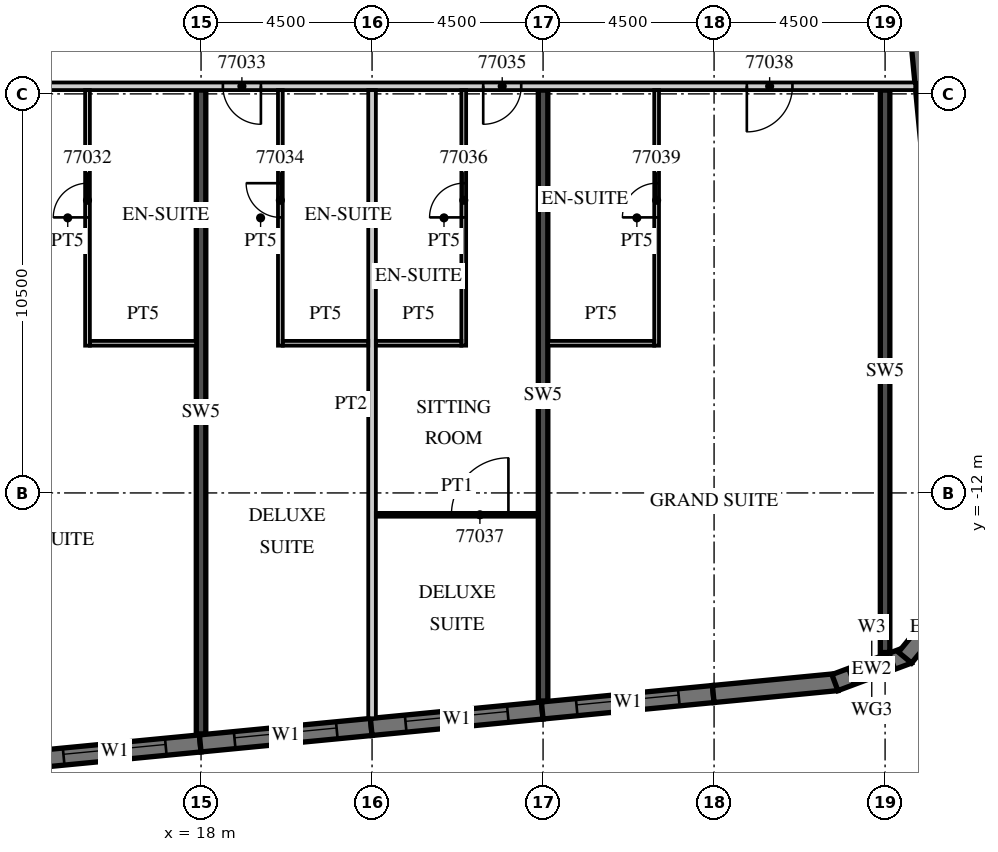
"""IFC4 building model, lengths in metres.
Left out: names, types, materials, properties, quantities, classifications, styles, units other than length and angle.
Written with IfcOpenShell. Run it as: python <this file> out.ifc"""

import sys

from ifc_helpers import new_model, si_unit, direction, frame, frame_2d, origin, place, context, subcontext, project, spatial, polyline, rectangle, outline, extrude, element, fill, save


model = new_model("IFC4")
c1 = context("Model", 3, precision=1e-05, world=origin(), true_north=direction((0.0, 1.0)))
c2 = subcontext(c1, "Body", "Model", "MODEL_VIEW")
j1 = project(units=[si_unit("LENGTHUNIT", "METRE"), si_unit("PLANEANGLEUNIT", "RADIAN")], contexts=[c1])
p1 = place(None, origin())
s1 = spatial("IfcSite", under=j1, at=p1, CompositionType="ELEMENT")
p2 = place(p1, origin())
s2 = spatial("IfcBuilding", under=s1, at=p2, CompositionType="ELEMENT")
p3 = place(p2, frame((0.0, 0.0, 304.8)))
s3 = spatial("IfcBuildingStorey", under=s2, at=p3, CompositionType="ELEMENT", Elevation=304.8)
p4 = place(p3, frame((18.0, -18.341, 0.0), z_axis=(0.0, 0.0, 1.0), x_axis=(0.0, 1.0, 0.0)))
e1 = element("IfcWall", 1, at=p4, inside=s3, PredefinedType="SHEAR", context=c2, shape_type="SweptSolid", body=[
    extrude(rectangle(XDim=16.941, YDim=0.25, at=frame_2d((8.47, 0.0))), origin(), (0.0, 0.0, 1.0), 3.3),
])
p5 = place(p3, frame((27.0, -17.474, 0.0), z_axis=(0.0, 0.0, 1.0), x_axis=(0.0, 1.0, 0.0)))
e2 = element("IfcWall", 2, at=p5, inside=s3, PredefinedType="SHEAR", context=c2, shape_type="SweptSolid", body=[
    extrude(rectangle(XDim=16.074, YDim=0.25, at=frame_2d((8.037, 0.0))), origin(), (0.0, 0.0, 1.0), 3.3),
])
p6 = place(p3, frame((36.0, -16.199, 0.0), z_axis=(0.0, 0.0, 1.0), x_axis=(0.0, 1.0, 0.0)))
e3 = element("IfcWall", 3, at=p6, inside=s3, PredefinedType="SHEAR", context=c2, shape_type="SweptSolid", body=[
    extrude(rectangle(XDim=14.799, YDim=0.25, at=frame_2d((7.399, 0.0))), origin(), (0.0, 0.0, 1.0), 3.3),
])
p7 = place(p3, frame((13.478, -19.024, 0.0), z_axis=(0.0, 0.0, 1.0), x_axis=(0.995395662684, 0.095851315644, 0.0)))
e4 = element("IfcWall", 4, at=p7, inside=s3, PredefinedType="SOLIDWALL", context=c2, shape_type="SweptSolid", body=[
    extrude(rectangle(XDim=4.521, YDim=0.45, at=frame_2d((2.26, 0.0))), origin(), (0.0, 0.0, 1.0), 2.9),
])
p8 = place(p7, frame((0.91, 0.0, 0.45)))
e5 = element("IfcOpeningElement", 5, at=p8, cuts=e4, PredefinedType="OPENING", context=c2, shape_type="SweptSolid", body=[
    extrude(rectangle(XDim=2.7, YDim=2.25, at=frame_2d((1.35, 1.125))), frame((0.0, 0.235, 0.0), z_axis=(0.0, -1.0, 0.0), x_axis=(1.0, 0.0, 0.0)), (0.0, 0.0, 1.0), 0.47),
])
p9 = place(p3, frame((17.979, -18.591, 0.0), z_axis=(0.0, 0.0, 1.0), x_axis=(0.995395166513, 0.095856468129, 0.0)))
e6 = element("IfcWall", 6, at=p9, inside=s3, PredefinedType="SOLIDWALL", context=c2, shape_type="SweptSolid", body=[
    extrude(rectangle(XDim=4.521, YDim=0.45, at=frame_2d((2.26, 0.0))), origin(), (0.0, 0.0, 1.0), 2.9),
])
p10 = place(p9, frame((0.91, 0.0, 0.45)))
e7 = element("IfcOpeningElement", 7, at=p10, cuts=e6, PredefinedType="OPENING", context=c2, shape_type="SweptSolid", body=[
    extrude(rectangle(XDim=2.7, YDim=2.25, at=frame_2d((1.35, 1.125))), frame((0.0, 0.235, 0.0), z_axis=(0.0, -1.0, 0.0), x_axis=(1.0, 0.0, 0.0)), (0.0, 0.0, 1.0), 0.47),
])
p11 = place(p3, frame((22.479, -18.157, 0.0), z_axis=(0.0, 0.0, 1.0), x_axis=(0.995400317863, 0.09580296028, 0.0)))
e8 = element("IfcWall", 8, at=p11, inside=s3, PredefinedType="SOLIDWALL", context=c2, shape_type="SweptSolid", body=[
    extrude(rectangle(XDim=4.521, YDim=0.45, at=frame_2d((2.26, 0.0))), origin(), (0.0, 0.0, 1.0), 2.9),
])
p12 = place(p11, frame((0.91, 0.0, 0.45)))
e9 = element("IfcOpeningElement", 9, at=p12, cuts=e8, PredefinedType="OPENING", context=c2, shape_type="SweptSolid", body=[
    extrude(rectangle(XDim=2.7, YDim=2.25, at=frame_2d((1.35, 1.125))), frame((0.0, 0.235, 0.0), z_axis=(0.0, -1.0, 0.0), x_axis=(1.0, 0.0, 0.0)), (0.0, 0.0, 1.0), 0.47),
])
p13 = place(p3, frame((26.979, -17.724, 0.0), z_axis=(0.0, 0.0, 1.0), x_axis=(0.995395166513, 0.095856468129, 0.0)))
e10 = element("IfcWall", 10, at=p13, inside=s3, PredefinedType="SOLIDWALL", context=c2, shape_type="SweptSolid", body=[
    extrude(rectangle(XDim=4.521, YDim=0.45, at=frame_2d((2.26, 0.0))), origin(), (0.0, 0.0, 1.0), 2.9),
])
p14 = place(p13, frame((0.91, 0.0, 0.45)))
e11 = element("IfcOpeningElement", 11, at=p14, cuts=e10, PredefinedType="OPENING", context=c2, shape_type="SweptSolid", body=[
    extrude(rectangle(XDim=2.7, YDim=2.25, at=frame_2d((1.35, 1.125))), frame((0.0, 0.235, 0.0), z_axis=(0.0, -1.0, 0.0), x_axis=(1.0, 0.0, 0.0)), (0.0, 0.0, 1.0), 0.47),
])
p15 = place(p3, frame((31.479, -17.291, 0.0), z_axis=(0.0, 0.0, 1.0), x_axis=(0.995396037172, 0.095847426584, 0.0)))
e12 = element("IfcWall", 12, at=p15, inside=s3, PredefinedType="SOLIDWALL", context=c2, shape_type="SweptSolid", body=[
    extrude(rectangle(XDim=3.273, YDim=0.45, at=frame_2d((1.637, 0.0))), origin(), (0.0, 0.0, 1.0), 2.9),
])
p16 = place(p3, frame((34.679, -16.99, 0.0), z_axis=(0.0, 0.0, 1.0), x_axis=(0.936677599948, 0.350192909346, 0.0)))
e13 = element("IfcWall", 13, at=p16, inside=s3, PredefinedType="SOLIDWALL", context=c2, shape_type="SweptSolid", body=[
    extrude(outline(polyline([(0.0, -0.225), (2.071, -0.225), (1.95, 0.225), (0.121, 0.225), (0.0, -0.225)])), origin(), (0.0, 0.0, 1.0), 2.9),
])
p17 = place(p16, frame((0.435, 0.0, 0.45)))
e14 = element("IfcOpeningElement", 14, at=p17, cuts=e13, PredefinedType="OPENING", context=c2, shape_type="SweptSolid", body=[
    extrude(rectangle(XDim=1.2, YDim=2.25, at=frame_2d((0.6, 1.125))), frame((0.0, 0.235, 0.0), z_axis=(0.0, -1.0, 0.0), x_axis=(1.0, 0.0, 0.0)), (0.0, 0.0, 1.0), 0.47),
])
p18 = place(p3, frame((36.524, -16.333, 0.0), z_axis=(0.0, 0.0, 1.0), x_axis=(0.636046112757, 0.771651049663, 0.0)))
e15 = element("IfcWall", 15, at=p18, inside=s3, PredefinedType="SOLIDWALL", context=c2, shape_type="SweptSolid", body=[
    extrude(outline(polyline([(0.0, -0.225), (2.071, -0.225), (1.95, 0.225), (0.121, 0.225), (0.0, -0.225)])), origin(), (0.0, 0.0, 1.0), 2.9),
])
p19 = place(p3, frame((37.445, -5.722, 0.0), z_axis=(0.0, 0.0, 1.0), x_axis=(-0.09580296028, 0.995400317863, 0.0)))
e16 = element("IfcWall", 16, at=p19, inside=s3, PredefinedType="SOLIDWALL", context=c2, shape_type="SweptSolid", body=[
    extrude(rectangle(XDim=4.521, YDim=0.45, at=frame_2d((2.26, 0.0))), origin(), (0.0, 0.0, 1.0), 2.9),
])
p20 = place(p3, frame((37.012, -1.222, 0.0), z_axis=(0.0, 0.0, 1.0), x_axis=(-0.095884111621, 0.99539250406, 0.0)))
e17 = element("IfcWall", 17, at=p20, inside=s3, PredefinedType="SOLIDWALL", context=c2, shape_type="SweptSolid", body=[
    extrude(rectangle(XDim=2.411, YDim=0.45, at=frame_2d((1.206, 0.0))), origin(), (0.0, 0.0, 1.0), 2.9),
])
p21 = place(p3, frame((-13.5, -1.3, 0.0), z_axis=(0.0, 0.0, 1.0), x_axis=(1.0, 0.0, 0.0)))
e18 = element("IfcWall", 18, at=p21, inside=s3, PredefinedType="PARTITIONING", context=c2, shape_type="SweptSolid", body=[
    extrude(rectangle(XDim=50.293, YDim=0.2, at=frame_2d((25.146, 0.0))), origin(), (0.0, 0.0, 1.0), 2.9),
])
p22 = place(p21, frame((0.575, 0.0, 0.0)))
e19 = element("IfcOpeningElement", 19, at=p22, cuts=e18, PredefinedType="OPENING", context=c2, shape_type="SweptSolid", body=[
    extrude(rectangle(XDim=1.0, YDim=2.1, at=frame_2d((0.5, 1.05))), frame((0.0, 0.11, 0.0), z_axis=(0.0, -1.0, 0.0), x_axis=(1.0, 0.0, 0.0)), (0.0, 0.0, 1.0), 0.22),
])
p23 = place(p21, frame((6.938, 0.0, 0.0)))
e20 = element("IfcOpeningElement", 20, at=p23, cuts=e18, PredefinedType="OPENING", context=c2, shape_type="SweptSolid", body=[
    extrude(rectangle(XDim=1.2, YDim=2.1, at=frame_2d((0.6, 1.05))), frame((0.0, 0.11, 0.0), z_axis=(0.0, -1.0, 0.0), x_axis=(1.0, 0.0, 0.0)), (0.0, 0.0, 1.0), 0.22),
])
p24 = place(p21, frame((16.45, 0.0, 0.0)))
e21 = element("IfcOpeningElement", 21, at=p24, cuts=e18, PredefinedType="OPENING", context=c2, shape_type="SweptSolid", body=[
    extrude(rectangle(XDim=1.0, YDim=2.1, at=frame_2d((0.5, 1.05))), frame((0.0, 0.11, 0.0), z_axis=(0.0, -1.0, 0.0), x_axis=(1.0, 0.0, 0.0)), (0.0, 0.0, 1.0), 0.22),
])
p25 = place(p21, frame((20.925, 0.0, 0.0)))
e22 = element("IfcOpeningElement", 22, at=p25, cuts=e18, PredefinedType="OPENING", context=c2, shape_type="SweptSolid", body=[
    extrude(rectangle(XDim=1.0, YDim=2.1, at=frame_2d((0.5, 1.05))), frame((0.0, 0.11, 0.0), z_axis=(0.0, -1.0, 0.0), x_axis=(1.0, 0.0, 0.0)), (0.0, 0.0, 1.0), 0.22),
])
p26 = place(p21, frame((24.938, 0.0, 0.0)))
e23 = element("IfcOpeningElement", 23, at=p26, cuts=e18, PredefinedType="OPENING", context=c2, shape_type="SweptSolid", body=[
    extrude(rectangle(XDim=1.2, YDim=2.1, at=frame_2d((0.6, 1.05))), frame((0.0, 0.11, 0.0), z_axis=(0.0, -1.0, 0.0), x_axis=(1.0, 0.0, 0.0)), (0.0, 0.0, 1.0), 0.22),
])
p27 = place(p21, frame((32.075, 0.0, 0.0)))
e24 = element("IfcOpeningElement", 24, at=p27, cuts=e18, PredefinedType="OPENING", context=c2, shape_type="SweptSolid", body=[
    extrude(rectangle(XDim=1.0, YDim=2.1, at=frame_2d((0.5, 1.05))), frame((0.0, 0.11, 0.0), z_axis=(0.0, -1.0, 0.0), x_axis=(1.0, 0.0, 0.0)), (0.0, 0.0, 1.0), 0.22),
])
p28 = place(p21, frame((38.925, 0.0, 0.0)))
e25 = element("IfcOpeningElement", 25, at=p28, cuts=e18, PredefinedType="OPENING", context=c2, shape_type="SweptSolid", body=[
    extrude(rectangle(XDim=1.0, YDim=2.1, at=frame_2d((0.5, 1.05))), frame((0.0, 0.11, 0.0), z_axis=(0.0, -1.0, 0.0), x_axis=(1.0, 0.0, 0.0)), (0.0, 0.0, 1.0), 0.22),
])
p29 = place(p21, frame((45.862, 0.0, 0.0)))
e26 = element("IfcOpeningElement", 26, at=p29, cuts=e18, PredefinedType="OPENING", context=c2, shape_type="SweptSolid", body=[
    extrude(rectangle(XDim=1.2, YDim=2.1, at=frame_2d((0.6, 1.05))), frame((0.0, 0.11, 0.0), z_axis=(0.0, -1.0, 0.0), x_axis=(1.0, 0.0, 0.0)), (0.0, 0.0, 1.0), 0.22),
])
p30 = place(p3, frame((15.012, -8.125, 0.0), z_axis=(0.0, 0.0, 1.0), x_axis=(0.0, 1.0, 0.0)))
e27 = element("IfcWall", 27, at=p30, inside=s3, PredefinedType="PARTITIONING", context=c2, shape_type="SweptSolid", body=[
    extrude(rectangle(XDim=6.725, YDim=0.125, at=frame_2d((3.363, 0.0))), origin(), (0.0, 0.0, 1.0), 2.9),
])
p31 = place(p30, frame((3.375, 0.0, 0.0)))
e28 = element("IfcOpeningElement", 28, at=p31, cuts=e27, PredefinedType="OPENING", context=c2, shape_type="SweptSolid", body=[
    extrude(rectangle(XDim=0.9, YDim=2.1, at=frame_2d((0.45, 1.05))), frame((0.0, 0.073, 0.0), z_axis=(0.0, -1.0, 0.0), x_axis=(1.0, 0.0, 0.0)), (0.0, 0.0, 1.0), 0.145),
])
p32 = place(p3, frame((15.075, -8.062, 0.0), z_axis=(0.0, 0.0, 1.0), x_axis=(1.0, 0.0, 0.0)))
e29 = element("IfcWall", 29, at=p32, inside=s3, PredefinedType="PARTITIONING", context=c2, shape_type="SweptSolid", body=[
    extrude(rectangle(XDim=2.8, YDim=0.125, at=frame_2d((1.4, 0.0))), origin(), (0.0, 0.0, 1.0), 2.9),
])
p33 = place(p3, frame((22.5, -17.929, 0.0), z_axis=(0.0, 0.0, 1.0), x_axis=(0.0, 1.0, 0.0)))
e30 = element("IfcWall", 30, at=p33, inside=s3, PredefinedType="PARTITIONING", context=c2, shape_type="SweptSolid", body=[
    extrude(rectangle(XDim=16.529, YDim=0.2, at=frame_2d((8.265, 0.0))), origin(), (0.0, 0.0, 1.0), 2.9),
])
p34 = place(p3, frame((20.087, -8.125, 0.0), z_axis=(0.0, 0.0, 1.0), x_axis=(0.0, 1.0, 0.0)))
e31 = element("IfcWall", 31, at=p34, inside=s3, PredefinedType="PARTITIONING", context=c2, shape_type="SweptSolid", body=[
    extrude(rectangle(XDim=6.725, YDim=0.125, at=frame_2d((3.363, 0.0))), origin(), (0.0, 0.0, 1.0), 2.9),
])
p35 = place(p34, frame((3.375, 0.0, 0.0)))
e32 = element("IfcOpeningElement", 32, at=p35, cuts=e31, PredefinedType="OPENING", context=c2, shape_type="SweptSolid", body=[
    extrude(rectangle(XDim=0.9, YDim=2.1, at=frame_2d((0.45, 1.05))), frame((0.0, 0.073, 0.0), z_axis=(0.0, -1.0, 0.0), x_axis=(1.0, 0.0, 0.0)), (0.0, 0.0, 1.0), 0.145),
])
p36 = place(p3, frame((20.15, -8.062, 0.0), z_axis=(0.0, 0.0, 1.0), x_axis=(1.0, 0.0, 0.0)))
e33 = element("IfcWall", 33, at=p36, inside=s3, PredefinedType="PARTITIONING", context=c2, shape_type="SweptSolid", body=[
    extrude(rectangle(XDim=2.25, YDim=0.125, at=frame_2d((1.125, 0.0))), origin(), (0.0, 0.0, 1.0), 2.9),
])
p37 = place(p3, frame((24.913, -8.125, 0.0), z_axis=(0.0, 0.0, 1.0), x_axis=(0.0, 1.0, 0.0)))
e34 = element("IfcWall", 34, at=p37, inside=s3, PredefinedType="PARTITIONING", context=c2, shape_type="SweptSolid", body=[
    extrude(rectangle(XDim=6.725, YDim=0.125, at=frame_2d((3.363, 0.0))), origin(), (0.0, 0.0, 1.0), 2.9),
])
p38 = place(p37, frame((3.375, 0.0, 0.0)))
e35 = element("IfcOpeningElement", 35, at=p38, cuts=e34, PredefinedType="OPENING", context=c2, shape_type="SweptSolid", body=[
    extrude(rectangle(XDim=0.9, YDim=2.1, at=frame_2d((0.45, 1.05))), frame((0.0, 0.073, 0.0), z_axis=(0.0, -1.0, 0.0), x_axis=(1.0, 0.0, 0.0)), (0.0, 0.0, 1.0), 0.145),
])
p39 = place(p3, frame((22.6, -8.062, 0.0), z_axis=(0.0, 0.0, 1.0), x_axis=(1.0, 0.0, 0.0)))
e36 = element("IfcWall", 36, at=p39, inside=s3, PredefinedType="PARTITIONING", context=c2, shape_type="SweptSolid", body=[
    extrude(rectangle(XDim=2.25, YDim=0.125, at=frame_2d((1.125, 0.0))), origin(), (0.0, 0.0, 1.0), 2.9),
])
p40 = place(p3, frame((22.6, -12.575, 0.0), z_axis=(0.0, 0.0, 1.0), x_axis=(1.0, 0.0, 0.0)))
e37 = element("IfcWall", 37, at=p40, inside=s3, PredefinedType="PARTITIONING", context=c2, shape_type="SweptSolid", body=[
    extrude(rectangle(XDim=4.275, YDim=0.1, at=frame_2d((2.137, 0.0))), origin(), (0.0, 0.0, 1.0), 2.9),
])
p41 = place(p40, frame((1.988, 0.0, 0.0)))
e38 = element("IfcOpeningElement", 38, at=p41, cuts=e37, PredefinedType="OPENING", context=c2, shape_type="SweptSolid", body=[
    extrude(rectangle(XDim=1.5, YDim=2.1, at=frame_2d((0.75, 1.05))), frame((0.0, 0.06, 0.0), z_axis=(0.0, -1.0, 0.0), x_axis=(1.0, 0.0, 0.0)), (0.0, 0.0, 1.0), 0.12),
])
p42 = place(p3, frame((29.988, -8.125, 0.0), z_axis=(0.0, 0.0, 1.0), x_axis=(0.0, 1.0, 0.0)))
e39 = element("IfcWall", 39, at=p42, inside=s3, PredefinedType="PARTITIONING", context=c2, shape_type="SweptSolid", body=[
    extrude(rectangle(XDim=6.725, YDim=0.125, at=frame_2d((3.363, 0.0))), origin(), (0.0, 0.0, 1.0), 2.9),
])
p43 = place(p42, frame((3.375, 0.0, 0.0)))
e40 = element("IfcOpeningElement", 40, at=p43, cuts=e39, PredefinedType="OPENING", context=c2, shape_type="SweptSolid", body=[
    extrude(rectangle(XDim=0.9, YDim=2.1, at=frame_2d((0.45, 1.05))), frame((0.0, 0.073, 0.0), z_axis=(0.0, -1.0, 0.0), x_axis=(1.0, 0.0, 0.0)), (0.0, 0.0, 1.0), 0.145),
])
p44 = place(p3, frame((27.125, -8.062, 0.0), z_axis=(0.0, 0.0, 1.0), x_axis=(1.0, 0.0, 0.0)))
e41 = element("IfcWall", 41, at=p44, inside=s3, PredefinedType="PARTITIONING", context=c2, shape_type="SweptSolid", body=[
    extrude(rectangle(XDim=2.8, YDim=0.125, at=frame_2d((1.4, 0.0))), origin(), (0.0, 0.0, 1.0), 2.9),
])
p45 = place(p8, origin())
e42 = element("IfcWindow", 42, at=p45, inside=s3, PartitioningType="SINGLE_PANEL", PredefinedType="WINDOW", context=c2, shape_type="SweptSolid", body=[
    extrude(rectangle(XDim=2.7, YDim=2.25, at=frame_2d((1.35, 1.125))), frame((0.0, 0.09, 0.0), z_axis=(0.0, -1.0, 0.0), x_axis=(1.0, 0.0, 0.0)), (0.0, 0.0, 1.0), 0.06),
])
fill(e5, e42)
p46 = place(p10, origin())
e43 = element("IfcWindow", 43, at=p46, inside=s3, PartitioningType="SINGLE_PANEL", PredefinedType="WINDOW", context=c2, shape_type="SweptSolid", body=[
    extrude(rectangle(XDim=2.7, YDim=2.25, at=frame_2d((1.35, 1.125))), frame((0.0, 0.09, 0.0), z_axis=(0.0, -1.0, 0.0), x_axis=(1.0, 0.0, 0.0)), (0.0, 0.0, 1.0), 0.06),
])
fill(e7, e43)
p47 = place(p12, origin())
e44 = element("IfcWindow", 44, at=p47, inside=s3, PartitioningType="SINGLE_PANEL", PredefinedType="WINDOW", context=c2, shape_type="SweptSolid", body=[
    extrude(rectangle(XDim=2.7, YDim=2.25, at=frame_2d((1.35, 1.125))), frame((0.0, 0.09, 0.0), z_axis=(0.0, -1.0, 0.0), x_axis=(1.0, 0.0, 0.0)), (0.0, 0.0, 1.0), 0.06),
])
fill(e9, e44)
p48 = place(p14, origin())
e45 = element("IfcWindow", 45, at=p48, inside=s3, PartitioningType="SINGLE_PANEL", PredefinedType="WINDOW", context=c2, shape_type="SweptSolid", body=[
    extrude(rectangle(XDim=2.7, YDim=2.25, at=frame_2d((1.35, 1.125))), frame((0.0, 0.09, 0.0), z_axis=(0.0, -1.0, 0.0), x_axis=(1.0, 0.0, 0.0)), (0.0, 0.0, 1.0), 0.06),
])
fill(e11, e45)
p49 = place(p17, origin())
e46 = element("IfcWindow", 46, at=p49, inside=s3, PartitioningType="SINGLE_PANEL", PredefinedType="WINDOW", context=c2, shape_type="SweptSolid", body=[
    extrude(rectangle(XDim=1.2, YDim=2.25, at=frame_2d((0.6, 1.125))), frame((0.0, 0.09, 0.0), z_axis=(0.0, -1.0, 0.0), x_axis=(1.0, 0.0, 0.0)), (0.0, 0.0, 1.0), 0.06),
])
fill(e14, e46)
p50 = place(p31, origin())
e47 = element("IfcDoor", 47, at=p50, inside=s3, OperationType="SINGLE_SWING_LEFT", PredefinedType="DOOR", context=c2, shape_type="SweptSolid", body=[
    extrude(rectangle(XDim=0.9, YDim=2.1, at=frame_2d((0.45, 1.05))), frame((0.0, 0.025, 0.0), z_axis=(0.0, -1.0, 0.0), x_axis=(1.0, 0.0, 0.0)), (0.0, 0.0, 1.0), 0.05),
])
fill(e28, e47)
p51 = place(p27, origin())
e48 = element("IfcDoor", 48, at=p51, inside=s3, OperationType="SINGLE_SWING_RIGHT", PredefinedType="DOOR", context=c2, shape_type="SweptSolid", body=[
    extrude(rectangle(XDim=1.0, YDim=2.1, at=frame_2d((0.5, 1.05))), frame((0.0, 0.025, 0.0), z_axis=(0.0, -1.0, 0.0), x_axis=(1.0, 0.0, 0.0)), (0.0, 0.0, 1.0), 0.05),
])
fill(e24, e48)
p52 = place(p35, origin())
e49 = element("IfcDoor", 49, at=p52, inside=s3, OperationType="SINGLE_SWING_RIGHT", PredefinedType="DOOR", context=c2, shape_type="SweptSolid", body=[
    extrude(rectangle(XDim=0.9, YDim=2.1, at=frame_2d((0.45, 1.05))), frame((0.0, 0.025, 0.0), z_axis=(0.0, -1.0, 0.0), x_axis=(1.0, 0.0, 0.0)), (0.0, 0.0, 1.0), 0.05),
])
fill(e32, e49)
p53 = place(p28, origin())
e50 = element("IfcDoor", 50, at=p53, inside=s3, OperationType="SINGLE_SWING_LEFT", PredefinedType="DOOR", context=c2, shape_type="SweptSolid", body=[
    extrude(rectangle(XDim=1.0, YDim=2.1, at=frame_2d((0.5, 1.05))), frame((0.0, 0.025, 0.0), z_axis=(0.0, -1.0, 0.0), x_axis=(1.0, 0.0, 0.0)), (0.0, 0.0, 1.0), 0.05),
])
fill(e25, e50)
p54 = place(p38, origin())
e51 = element("IfcDoor", 51, at=p54, inside=s3, OperationType="SINGLE_SWING_LEFT", PredefinedType="DOOR", context=c2, shape_type="SweptSolid", body=[
    extrude(rectangle(XDim=0.9, YDim=2.1, at=frame_2d((0.45, 1.05))), frame((0.0, 0.025, 0.0), z_axis=(0.0, -1.0, 0.0), x_axis=(1.0, 0.0, 0.0)), (0.0, 0.0, 1.0), 0.05),
])
fill(e35, e51)
p55 = place(p41, origin())
e52 = element("IfcDoor", 52, at=p55, inside=s3, OperationType="SINGLE_SWING_RIGHT", PredefinedType="DOOR", context=c2, shape_type="SweptSolid", body=[
    extrude(rectangle(XDim=1.5, YDim=2.1, at=frame_2d((0.75, 1.05))), frame((0.0, 0.025, 0.0), z_axis=(0.0, -1.0, 0.0), x_axis=(1.0, 0.0, 0.0)), (0.0, 0.0, 1.0), 0.05),
])
fill(e38, e52)
p56 = place(p29, origin())
e53 = element("IfcDoor", 53, at=p56, inside=s3, OperationType="SINGLE_SWING_LEFT", PredefinedType="DOOR", context=c2, shape_type="SweptSolid", body=[
    extrude(rectangle(XDim=1.2, YDim=2.1, at=frame_2d((0.6, 1.05))), frame((0.0, 0.025, 0.0), z_axis=(0.0, -1.0, 0.0), x_axis=(1.0, 0.0, 0.0)), (0.0, 0.0, 1.0), 0.05),
])
fill(e26, e53)
p57 = place(p43, origin())
e54 = element("IfcDoor", 54, at=p57, inside=s3, OperationType="SINGLE_SWING_LEFT", PredefinedType="DOOR", context=c2, shape_type="SweptSolid", body=[
    extrude(rectangle(XDim=0.9, YDim=2.1, at=frame_2d((0.45, 1.05))), frame((0.0, 0.025, 0.0), z_axis=(0.0, -1.0, 0.0), x_axis=(1.0, 0.0, 0.0)), (0.0, 0.0, 1.0), 0.05),
])
fill(e40, e54)
save(model, sys.argv[1])
